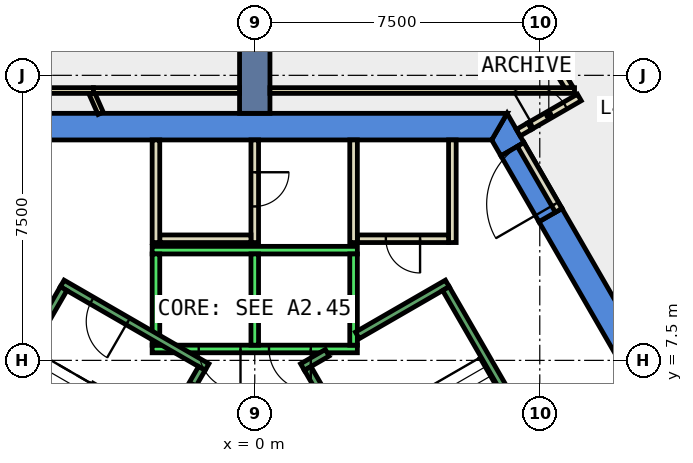
"""IFC4 building model, lengths in metres.
Left out: names, types, materials, properties, quantities, classifications, styles, units other than length and angle.
Written with IfcOpenShell. Run it as: python <this file> out.ifc"""

import sys

from ifc_helpers import new_model, si_unit, direction, frame, frame_2d, origin, place, context, subcontext, project, spatial, polyline, rectangle, outline, extrude, element, fill, save


model = new_model("IFC4")
c1 = context("Model", 3, precision=1e-05, world=origin(), true_north=direction((0.0, 1.0)))
c2 = subcontext(c1, "Body", "Model", "MODEL_VIEW")
j1 = project(units=[si_unit("LENGTHUNIT", "METRE"), si_unit("PLANEANGLEUNIT", "RADIAN")], contexts=[c1])
p1 = place(None, origin())
s1 = spatial("IfcSite", under=j1, at=p1, CompositionType="ELEMENT")
p2 = place(p1, origin())
s2 = spatial("IfcBuilding", under=s1, at=p2, CompositionType="ELEMENT")
p3 = place(p2, frame((0.0, 0.0, 219.2)))
s3 = spatial("IfcBuildingStorey", under=s2, at=p3, CompositionType="ELEMENT", Elevation=219.2)
p4 = place(p3, frame((0.0, 0.0, -0.4)))
e1 = element("IfcWall", 1, at=p4, inside=s3, PredefinedType="SHEAR", context=c2, shape_type="SweptSolid", body=[
    extrude(outline(polyline([(8.084, 11.498), (7.478, 11.148), (12.471, 2.5), (13.279, 2.5), (8.084, 11.498)])), origin(), (0.0, 0.0, 1.0), 4.2),
])
p5 = place(p3, frame((0.0, 0.0, -0.4)))
e2 = element("IfcWall", 2, at=p5, inside=s3, PredefinedType="SHEAR", context=c2, shape_type="SweptSolid", body=[
    extrude(outline(polyline([(6.478, 12.88), (7.084, 13.23), (6.64, 14.0), (6.235, 13.3), (6.478, 12.88)])), origin(), (0.0, 0.0, 1.0), 4.2),
])
p6 = place(p3, frame((0.0, 0.0, 3.6)))
e3 = element("IfcWall", 3, at=p6, inside=s3, PredefinedType="SHEAR", context=c2, shape_type="SweptSolid", body=[
    extrude(outline(polyline([(7.084, 13.23), (6.478, 12.88), (7.478, 11.148), (8.084, 11.498), (7.084, 13.23)])), origin(), (0.0, 0.0, 1.0), 0.2),
])
p7 = place(p3, frame((0.0, 0.0, -0.4)))
e4 = element("IfcWall", 4, at=p7, inside=s3, PredefinedType="SHEAR", context=c2, shape_type="SweptSolid", body=[
    extrude(outline(polyline([(6.64, 14.0), (-6.64, 14.0), (-6.235, 13.3), (6.235, 13.3), (6.64, 14.0)])), origin(), (0.0, 0.0, 1.0), 4.2),
])
p8 = place(p3, frame((0.0, 14.0, -0.4), z_axis=(0.0, 0.0, 1.0), x_axis=(0.0, 1.0, 0.0)))
e5 = element("IfcWall", 5, at=p8, inside=s3, PredefinedType="SHEAR", context=c2, shape_type="SweptSolid", body=[
    extrude(rectangle(XDim=9.0, YDim=0.8, at=frame_2d((4.5, 0.0))), origin(), (0.0, 0.0, 1.0), 4.2),
])
p9 = place(p3, frame((6.934, 13.49, 0.0), z_axis=(0.0, 0.0, 1.0), x_axis=(0.865871789474, 0.500265973451, 0.0)))
e6 = element("IfcWall", 6, at=p9, inside=s3, PredefinedType="PARTITIONING", context=c2, shape_type="SweptSolid", body=[
    extrude(rectangle(XDim=0.35, YDim=0.2, at=frame_2d((0.175, 0.0))), origin(), (0.0, 0.0, 1.0), 2.4),
])
p10 = place(p3, frame((8.276, 14.664, 0.0), z_axis=(0.0, 0.0, 1.0), x_axis=(-0.515416266777, 0.85693994652, 0.0)))
e7 = element("IfcWall", 7, at=p10, inside=s3, PredefinedType="PARTITIONING", context=c2, shape_type="SweptSolid", body=[
    extrude(rectangle(XDim=3.587, YDim=0.2, at=frame_2d((1.793, 0.0))), origin(), (0.0, 0.0, 1.0), 3.8),
])
p11 = place(p3, frame((8.046, 18.732, 0.0), z_axis=(0.0, 0.0, 1.0), x_axis=(0.515502328211, -0.856888178007, 0.0)))
e8 = element("IfcWall", 8, at=p11, inside=s3, PredefinedType="PARTITIONING", context=c2, shape_type="SweptSolid", body=[
    extrude(rectangle(XDim=8.058, YDim=0.2, at=frame_2d((4.029, 0.0))), origin(), (0.0, 0.0, 1.0), 3.8),
])
p12 = place(p11, frame((3.604, 0.0, 0.0)))
e9 = element("IfcOpeningElement", 9, at=p12, cuts=e8, PredefinedType="OPENING", context=c2, shape_type="SweptSolid", body=[
    extrude(rectangle(XDim=1.0, YDim=2.1, at=frame_2d((0.5, 1.05))), frame((0.0, 0.11, 0.0), z_axis=(0.0, -1.0, 0.0), x_axis=(1.0, 0.0, 0.0)), (0.0, 0.0, 1.0), 0.22),
])
p13 = place(p3, frame((5.2, 13.3, 0.0), z_axis=(0.0, 0.0, 1.0), x_axis=(0.0, -1.0, 0.0)))
e10 = element("IfcWall", 10, at=p13, inside=s3, PredefinedType="PARTITIONING", context=c2, shape_type="SweptSolid", body=[
    extrude(rectangle(XDim=2.7, YDim=0.2, at=frame_2d((1.35, 0.0))), origin(), (0.0, 0.0, 1.0), 3.8),
])
p14 = place(p3, frame((5.1, 10.7, 0.0), z_axis=(0.0, 0.0, 1.0), x_axis=(-1.0, 0.0, 0.0)))
e11 = element("IfcWall", 11, at=p14, inside=s3, PredefinedType="PARTITIONING", context=c2, shape_type="SweptSolid", body=[
    extrude(rectangle(XDim=2.4, YDim=0.2, at=frame_2d((1.2, 0.0))), origin(), (0.0, 0.0, 1.0), 3.8),
])
p15 = place(p14, frame((0.75, 0.0, 0.0)))
e12 = element("IfcOpeningElement", 12, at=p15, cuts=e11, PredefinedType="OPENING", context=c2, shape_type="SweptSolid", body=[
    extrude(rectangle(XDim=0.9, YDim=2.1, at=frame_2d((0.45, 1.05))), frame((0.0, 0.11, 0.0), z_axis=(0.0, -1.0, 0.0), x_axis=(1.0, 0.0, 0.0)), (0.0, 0.0, 1.0), 0.22),
])
p16 = place(p3, frame((2.6, 10.6, 0.0), z_axis=(0.0, 0.0, 1.0), x_axis=(0.0, 1.0, 0.0)))
e13 = element("IfcWall", 13, at=p16, inside=s3, PredefinedType="PARTITIONING", context=c2, shape_type="SweptSolid", body=[
    extrude(rectangle(XDim=2.7, YDim=0.2, at=frame_2d((1.35, 0.0))), origin(), (0.0, 0.0, 1.0), 3.8),
])
p17 = place(p3, frame((0.0, 13.3, 0.0), z_axis=(0.0, 0.0, 1.0), x_axis=(0.0, -1.0, 0.0)))
e14 = element("IfcWall", 14, at=p17, inside=s3, PredefinedType="PARTITIONING", context=c2, shape_type="SweptSolid", body=[
    extrude(rectangle(XDim=2.7, YDim=0.2, at=frame_2d((1.35, 0.0))), origin(), (0.0, 0.0, 1.0), 3.8),
])
p18 = place(p17, frame((0.85, 0.0, 0.0)))
e15 = element("IfcOpeningElement", 15, at=p18, cuts=e14, PredefinedType="OPENING", context=c2, shape_type="SweptSolid", body=[
    extrude(rectangle(XDim=0.9, YDim=2.1, at=frame_2d((0.45, 1.05))), frame((0.0, 0.11, 0.0), z_axis=(0.0, -1.0, 0.0), x_axis=(1.0, 0.0, 0.0)), (0.0, 0.0, 1.0), 0.22),
])
p19 = place(p3, frame((-0.1, 10.7, 0.0), z_axis=(0.0, 0.0, 1.0), x_axis=(-1.0, 0.0, 0.0)))
e16 = element("IfcWall", 16, at=p19, inside=s3, PredefinedType="PARTITIONING", context=c2, shape_type="SweptSolid", body=[
    extrude(rectangle(XDim=2.4, YDim=0.2, at=frame_2d((1.2, 0.0))), origin(), (0.0, 0.0, 1.0), 3.8),
])
p20 = place(p3, frame((-2.6, 10.6, 0.0), z_axis=(0.0, 0.0, 1.0), x_axis=(0.0, 1.0, 0.0)))
e17 = element("IfcWall", 17, at=p20, inside=s3, PredefinedType="PARTITIONING", context=c2, shape_type="SweptSolid", body=[
    extrude(rectangle(XDim=2.7, YDim=0.2, at=frame_2d((1.35, 0.0))), origin(), (0.0, 0.0, 1.0), 3.8),
])
p21 = place(p3, frame((-4.055, 14.0, 0.0), z_axis=(0.0, 0.0, 1.0), x_axis=(-0.404850841056, 0.914382740703, 0.0)))
e18 = element("IfcWall", 18, at=p21, inside=s3, PredefinedType="PARTITIONING", context=c2, shape_type="SweptSolid", body=[
    extrude(rectangle(XDim=0.581, YDim=0.15, at=frame_2d((0.291, 0.0))), origin(), (0.0, 0.0, 1.0), 3.8),
])
p22 = place(p3, frame((8.415, 14.6, 0.0), z_axis=(0.0, 0.0, 1.0), x_axis=(-1.0, 0.0, 0.0)))
e19 = element("IfcWall", 19, at=p22, inside=s3, PredefinedType="PARTITIONING", context=c2, shape_type="SweptSolid", body=[
    extrude(rectangle(XDim=8.015, YDim=0.15, at=frame_2d((4.008, 0.0))), origin(), (0.0, 0.0, 1.0), 3.8),
])
p23 = place(p3, frame((-4.245, 14.6, 0.0), z_axis=(0.0, 0.0, 1.0), x_axis=(-1.0, 0.0, 0.0)))
e20 = element("IfcWall", 20, at=p23, inside=s3, PredefinedType="PARTITIONING", context=c2, shape_type="SweptSolid", body=[
    extrude(rectangle(XDim=4.17, YDim=0.15, at=frame_2d((2.085, 0.0))), origin(), (0.0, 0.0, 1.0), 3.8),
])
p24 = place(p3, frame((7.997, 11.448, 0.0), z_axis=(0.0, 0.0, 1.0), x_axis=(-0.50002537861, 0.866010750942, 0.0)))
e21 = element("IfcWall", 21, at=p24, inside=s3, PredefinedType="PARTITIONING", context=c2, shape_type="SweptSolid", body=[
    extrude(rectangle(XDim=2.0, YDim=0.2, at=frame_2d((1.0, 0.0))), origin(), (0.0, 0.0, 1.0), 2.4),
])
p25 = place(p24, frame((0.19, 0.0, 0.0)))
e22 = element("IfcOpeningElement", 22, at=p25, cuts=e21, PredefinedType="OPENING", context=c2, shape_type="SweptSolid", body=[
    extrude(rectangle(XDim=1.8, YDim=2.1, at=frame_2d((0.9, 1.05))), frame((0.0, 0.11, 0.0), z_axis=(0.0, -1.0, 0.0), x_axis=(1.0, 0.0, 0.0)), (0.0, 0.0, 1.0), 0.22),
])
p26 = place(p3, frame((-0.4, 14.6, 0.0), z_axis=(0.0, 0.0, 1.0), x_axis=(-1.0, 0.0, 0.0)))
e23 = element("IfcWall", 23, at=p26, inside=s3, PredefinedType="PARTITIONING", context=c2, shape_type="SweptSolid", body=[
    extrude(rectangle(XDim=3.845, YDim=0.15, at=frame_2d((1.923, 0.0))), origin(), (0.0, 0.0, 1.0), 3.8),
])
p27 = place(p3, frame((7.237, 13.665, 0.0), z_axis=(0.0, 0.0, 1.0), x_axis=(0.865999269783, 0.500045262687, 0.0)))
e24 = element("IfcWall", 24, at=p27, inside=s3, PredefinedType="PARTITIONING", context=c2, shape_type="SweptSolid", body=[
    extrude(rectangle(XDim=1.506, YDim=0.2, at=frame_2d((0.753, 0.0))), origin(), (0.0, 0.0, 1.0), 3.8),
])
p28 = place(p27, frame((0.078, 0.0, 0.0)))
e25 = element("IfcOpeningElement", 25, at=p28, cuts=e24, PredefinedType="OPENING", context=c2, shape_type="SweptSolid", body=[
    extrude(rectangle(XDim=1.0, YDim=2.1, at=frame_2d((0.5, 1.05))), frame((0.0, 0.11, 0.0), z_axis=(0.0, -1.0, 0.0), x_axis=(1.0, 0.0, 0.0)), (0.0, 0.0, 1.0), 0.22),
])
p29 = place(p3, frame((2.7, 7.8, 0.0), z_axis=(0.0, 0.0, 1.0), x_axis=(-1.0, 0.0, 0.0)))
e26 = element("IfcWall", 26, at=p29, inside=s3, PredefinedType="STANDARD", context=c2, shape_type="SweptSolid", body=[
    extrude(rectangle(XDim=5.4, YDim=0.2, at=frame_2d((2.7, 0.0))), origin(), (0.0, 0.0, 1.0), 3.8),
])
p30 = place(p29, frame((1.225, 0.0, 0.0)))
e27 = element("IfcOpeningElement", 27, at=p30, cuts=e26, PredefinedType="OPENING", context=c2, shape_type="SweptSolid", body=[
    extrude(rectangle(XDim=1.1, YDim=2.1, at=frame_2d((0.55, 1.05))), frame((0.0, 0.11, 0.0), z_axis=(0.0, -1.0, 0.0), x_axis=(1.0, 0.0, 0.0)), (0.0, 0.0, 1.0), 0.22),
])
p31 = place(p29, frame((3.075, 0.0, 0.0)))
e28 = element("IfcOpeningElement", 28, at=p31, cuts=e26, PredefinedType="OPENING", context=c2, shape_type="SweptSolid", body=[
    extrude(rectangle(XDim=1.1, YDim=2.1, at=frame_2d((0.55, 1.05))), frame((0.0, 0.11, 0.0), z_axis=(0.0, -1.0, 0.0), x_axis=(1.0, 0.0, 0.0)), (0.0, 0.0, 1.0), 0.22),
])
p32 = place(p3, frame((2.7, 10.4, 0.0), z_axis=(0.0, 0.0, 1.0), x_axis=(-1.0, 0.0, 0.0)))
e29 = element("IfcWall", 29, at=p32, inside=s3, PredefinedType="STANDARD", context=c2, shape_type="SweptSolid", body=[
    extrude(rectangle(XDim=5.4, YDim=0.2, at=frame_2d((2.7, 0.0))), origin(), (0.0, 0.0, 1.0), 3.8),
])
for number, where, z_axis, x_axis in (
    (30, (2.6, 7.9, 0.0), (0.0, 0.0, 1.0), (0.0, 1.0, 0.0)),
    (31, (0.0, 7.9, 0.0), (0.0, 0.0, 1.0), (0.0, 1.0, 0.0)),
    (32, (-2.6, 7.9, 0.0), (0.0, 0.0, 1.0), (0.0, 1.0, 0.0)),
):
    element("IfcWall", number, at=place(p3, frame(where, z_axis=z_axis, x_axis=x_axis)), inside=s3, PredefinedType="STANDARD", context=c2, shape_type="SweptSolid", body=[
        extrude(rectangle(XDim=2.4, YDim=0.2, at=frame_2d((1.2, 0.0))), origin(), (0.0, 0.0, 1.0), 3.8),
    ])
p33 = place(p3, frame((2.7, 8.158, 0.0), z_axis=(0.0, 0.0, 1.0), x_axis=(0.86611865017, 0.499838457731, 0.0)))
e33 = element("IfcWall", 33, at=p33, inside=s3, PredefinedType="STANDARD", context=c2, shape_type="SweptSolid", body=[
    extrude(rectangle(XDim=2.733, YDim=0.2, at=frame_2d((1.366, 0.0))), origin(), (0.0, 0.0, 1.0), 3.8),
])
p34 = place(p3, frame((1.256, 7.324, 0.0), z_axis=(0.0, 0.0, 1.0), x_axis=(0.865915093549, 0.500191014278, 0.0)))
e34 = element("IfcWall", 34, at=p34, inside=s3, PredefinedType="STANDARD", context=c2, shape_type="SweptSolid", body=[
    extrude(rectangle(XDim=0.752, YDim=0.2, at=frame_2d((0.376, 0.0))), origin(), (0.0, 0.0, 1.0), 3.8),
])
p35 = place(p3, frame((4.843, 1.312, 0.0), z_axis=(0.0, 0.0, 1.0), x_axis=(-0.499963383562, 0.866046543262, 0.0)))
e35 = element("IfcWall", 35, at=p35, inside=s3, PredefinedType="STANDARD", context=c2, shape_type="SweptSolid", body=[
    extrude(rectangle(XDim=6.9, YDim=0.2, at=frame_2d((3.45, 0.0))), origin(), (0.0, 0.0, 1.0), 3.8),
])
p36 = place(p35, frame((0.45, 0.0, 0.0)))
e36 = element("IfcOpeningElement", 36, at=p36, cuts=e35, PredefinedType="OPENING", context=c2, shape_type="SweptSolid", body=[
    extrude(rectangle(XDim=1.1, YDim=2.2, at=frame_2d((0.55, 1.1))), frame((0.0, 0.11, 0.0), z_axis=(0.0, -1.0, 0.0), x_axis=(1.0, 0.0, 0.0)), (0.0, 0.0, 1.0), 0.22),
])
p37 = place(p3, frame((8.48, 3.412, 0.0), z_axis=(0.0, 0.0, 1.0), x_axis=(-0.499978703459, 0.866037698999, 0.0)))
e37 = element("IfcWall", 37, at=p37, inside=s3, PredefinedType="STANDARD", context=c2, shape_type="SweptSolid", body=[
    extrude(rectangle(XDim=6.9, YDim=0.2, at=frame_2d((3.45, 0.0))), origin(), (0.0, 0.0, 1.0), 3.8),
])
p38 = place(p3, frame((-1.256, 7.324, 0.0), z_axis=(0.0, 0.0, 1.0), x_axis=(-0.866046073146, 0.499964197906, 0.0)))
e38 = element("IfcWall", 38, at=p38, inside=s3, PredefinedType="STANDARD", context=c2, shape_type="SweptSolid", body=[
    extrude(rectangle(XDim=4.4, YDim=0.2, at=frame_2d((2.2, 0.0))), origin(), (0.0, 0.0, 1.0), 3.8),
])
p39 = place(p38, frame((2.4, 0.0, 0.0)))
e39 = element("IfcOpeningElement", 39, at=p39, cuts=e38, PredefinedType="OPENING", context=c2, shape_type="SweptSolid", body=[
    extrude(rectangle(XDim=1.1, YDim=2.2, at=frame_2d((0.55, 1.1))), frame((0.0, 0.11, 0.0), z_axis=(0.0, -1.0, 0.0), x_axis=(1.0, 0.0, 0.0)), (0.0, 0.0, 1.0), 0.22),
])
p40 = place(p3, frame((-1.393, 7.288, 0.0), z_axis=(0.0, 0.0, 1.0), x_axis=(-0.499963383562, -0.866046543262, 0.0)))
e40 = element("IfcWall", 40, at=p40, inside=s3, PredefinedType="STANDARD", context=c2, shape_type="SweptSolid", body=[
    extrude(rectangle(XDim=6.9, YDim=0.2, at=frame_2d((3.45, 0.0))), origin(), (0.0, 0.0, 1.0), 3.8),
])
p41 = place(p40, frame((0.45, 0.0, 0.0)))
e41 = element("IfcOpeningElement", 41, at=p41, cuts=e40, PredefinedType="OPENING", context=c2, shape_type="SweptSolid", body=[
    extrude(rectangle(XDim=1.1, YDim=2.2, at=frame_2d((0.55, 1.1))), frame((0.0, 0.11, 0.0), z_axis=(0.0, -1.0, 0.0), x_axis=(1.0, 0.0, 0.0)), (0.0, 0.0, 1.0), 0.22),
])
p42 = place(p3, frame((-5.03, 9.388, 0.0), z_axis=(0.0, 0.0, 1.0), x_axis=(-0.499978703459, -0.866037698999, 0.0)))
e42 = element("IfcWall", 42, at=p42, inside=s3, PredefinedType="STANDARD", context=c2, shape_type="SweptSolid", body=[
    extrude(rectangle(XDim=6.9, YDim=0.2, at=frame_2d((3.45, 0.0))), origin(), (0.0, 0.0, 1.0), 3.8),
])
p43 = place(p28, origin())
e43 = element("IfcDoor", 43, at=p43, inside=s3, OperationType="SINGLE_SWING_LEFT", PredefinedType="DOOR", context=c2, shape_type="SweptSolid", body=[
    extrude(rectangle(XDim=1.0, YDim=2.1, at=frame_2d((0.5, 1.05))), frame((0.0, 0.025, 0.0), z_axis=(0.0, -1.0, 0.0), x_axis=(1.0, 0.0, 0.0)), (0.0, 0.0, 1.0), 0.05),
])
fill(e25, e43)
p44 = place(p15, origin())
e44 = element("IfcDoor", 44, at=p44, inside=s3, OperationType="SINGLE_SWING_RIGHT", PredefinedType="DOOR", context=c2, shape_type="SweptSolid", body=[
    extrude(rectangle(XDim=0.9, YDim=2.1, at=frame_2d((0.45, 1.05))), frame((0.0, 0.025, 0.0), z_axis=(0.0, -1.0, 0.0), x_axis=(1.0, 0.0, 0.0)), (0.0, 0.0, 1.0), 0.05),
])
fill(e12, e44)
p45 = place(p18, origin())
e45 = element("IfcDoor", 45, at=p45, inside=s3, OperationType="SINGLE_SWING_RIGHT", PredefinedType="DOOR", context=c2, shape_type="SweptSolid", body=[
    extrude(rectangle(XDim=0.9, YDim=2.1, at=frame_2d((0.45, 1.05))), frame((0.0, 0.025, 0.0), z_axis=(0.0, -1.0, 0.0), x_axis=(1.0, 0.0, 0.0)), (0.0, 0.0, 1.0), 0.05),
])
fill(e15, e45)
p46 = place(p25, origin())
e46 = element("IfcDoor", 46, at=p46, inside=s3, OperationType="DOUBLE_DOOR_SINGLE_SWING", PredefinedType="DOOR", context=c2, shape_type="SweptSolid", body=[
    extrude(rectangle(XDim=1.8, YDim=2.1, at=frame_2d((0.9, 1.05))), frame((0.0, 0.025, 0.0), z_axis=(0.0, -1.0, 0.0), x_axis=(1.0, 0.0, 0.0)), (0.0, 0.0, 1.0), 0.05),
])
fill(e22, e46)
p47 = place(p30, origin())
e47 = element("IfcDoor", 47, at=p47, inside=s3, OperationType="SLIDING_TO_LEFT", PredefinedType="DOOR", context=c2, shape_type="SweptSolid", body=[
    extrude(rectangle(XDim=1.1, YDim=2.1, at=frame_2d((0.55, 1.05))), frame((0.0, 0.025, 0.0), z_axis=(0.0, -1.0, 0.0), x_axis=(1.0, 0.0, 0.0)), (0.0, 0.0, 1.0), 0.05),
])
fill(e27, e47)
p48 = place(p31, origin())
e48 = element("IfcDoor", 48, at=p48, inside=s3, OperationType="SLIDING_TO_LEFT", PredefinedType="DOOR", context=c2, shape_type="SweptSolid", body=[
    extrude(rectangle(XDim=1.1, YDim=2.1, at=frame_2d((0.55, 1.05))), frame((0.0, 0.025, 0.0), z_axis=(0.0, -1.0, 0.0), x_axis=(1.0, 0.0, 0.0)), (0.0, 0.0, 1.0), 0.05),
])
fill(e28, e48)
p49 = place(p41, origin())
e49 = element("IfcDoor", 49, at=p49, inside=s3, OperationType="SINGLE_SWING_LEFT", PredefinedType="DOOR", context=c2, shape_type="SweptSolid", body=[
    extrude(rectangle(XDim=1.1, YDim=2.2, at=frame_2d((0.55, 1.1))), frame((0.0, 0.025, 0.0), z_axis=(0.0, -1.0, 0.0), x_axis=(1.0, 0.0, 0.0)), (0.0, 0.0, 1.0), 0.05),
])
fill(e41, e49)
p50 = place(p39, origin())
e50 = element("IfcDoor", 50, at=p50, inside=s3, OperationType="SINGLE_SWING_LEFT", PredefinedType="DOOR", context=c2, shape_type="SweptSolid", body=[
    extrude(rectangle(XDim=1.1, YDim=2.2, at=frame_2d((0.55, 1.1))), frame((0.0, 0.025, 0.0), z_axis=(0.0, -1.0, 0.0), x_axis=(1.0, 0.0, 0.0)), (0.0, 0.0, 1.0), 0.05),
])
fill(e39, e50)
save(model, sys.argv[1])
